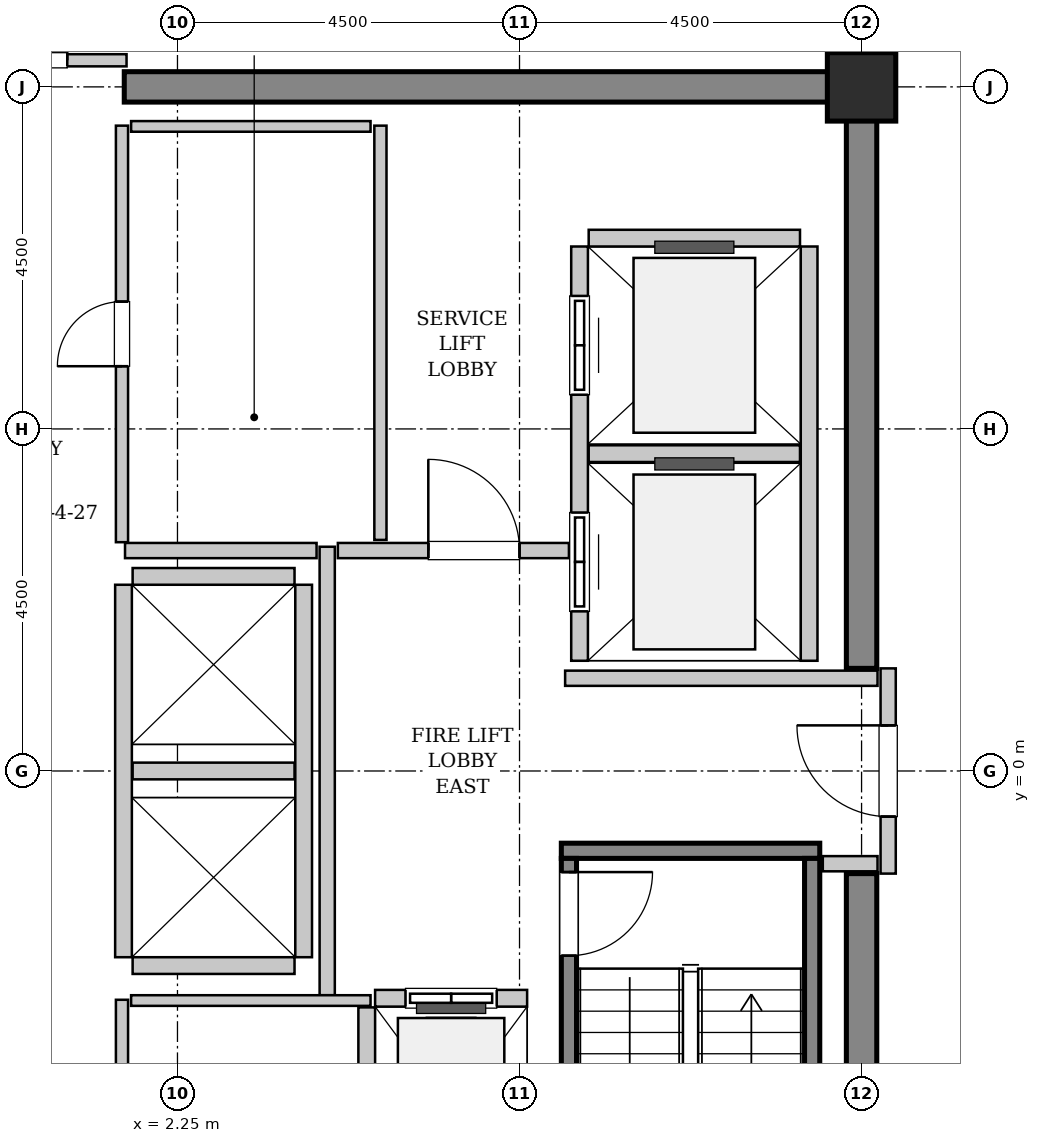
"""IFC4 building model, lengths in metres.
Left out: names, types, materials, properties, quantities, classifications, styles, units other than length and angle.
Written with IfcOpenShell. Run it as: python <this file> out.ifc"""

import sys

from ifc_helpers import new_model, si_unit, direction, frame, frame_2d, origin, origin_2d, place, context, subcontext, project, spatial, rectangle, extrude, source, transform, mapped, element, fill, save


model = new_model("IFC4")
c1 = context("Model", 3, precision=1e-05, world=origin(), true_north=direction((0.0, 1.0)))
c2 = subcontext(c1, "Body", "Model", "MODEL_VIEW")
j1 = project(units=[si_unit("LENGTHUNIT", "METRE"), si_unit("PLANEANGLEUNIT", "RADIAN")], contexts=[c1])
p1 = place(None, origin())
s1 = spatial("IfcSite", under=j1, at=p1, CompositionType="ELEMENT")
p2 = place(p1, origin())
s2 = spatial("IfcBuilding", under=s1, at=p2, CompositionType="ELEMENT")
p3 = place(p2, frame((0.0, 0.0, 326.2)))
s3 = spatial("IfcBuildingStorey", under=s2, at=p3, CompositionType="ELEMENT", Elevation=326.2)
m1 = source(origin(), c2, "Body", "SweptSolid", [
    extrude(rectangle(XDim=9.9, YDim=0.4, at=frame_2d((4.95, 0.0))), origin(), (0.0, 0.0, 1.0), 3.8),
])
p4 = place(p3, frame((1.55, 9.0, 0.0), z_axis=(0.0, 0.0, 1.0), x_axis=(1.0, 0.0, 0.0)))
e1 = element("IfcWall", 1, at=p4, inside=s3, PredefinedType="SHEAR", context=c2, shape_type="MappedRepresentation", body=[
    mapped(m1, transform((0.0, 0.0, 0.0), x_axis=(1.0, 0.0, 0.0), y_axis=(0.0, 1.0, 0.0), z_axis=(0.0, 0.0, 1.0), scale=1.0)),
])
m2 = source(origin(), c2, "Body", "SweptSolid", [
    extrude(rectangle(XDim=7.45, YDim=0.4, at=frame_2d((3.725, 0.0))), origin(), (0.0, 0.0, 1.0), 3.8),
])
for number, where, z_axis, x_axis in (
    (2, (11.25, -8.8, 0.0), (0.0, 0.0, 1.0), (0.0, 1.0, 0.0)),
    (3, (11.25, 1.35, 0.0), (0.0, 0.0, 1.0), (0.0, 1.0, 0.0)),
):
    element("IfcWall", number, at=place(p3, frame(where, z_axis=z_axis, x_axis=x_axis)), inside=s3, PredefinedType="SHEAR", context=c2, shape_type="MappedRepresentation", body=[
        mapped(m2, transform((0.0, 0.0, 0.0), x_axis=(1.0, 0.0, 0.0), y_axis=(0.0, 1.0, 0.0), z_axis=(0.0, 0.0, 1.0), scale=1.0)),
    ])
m3 = source(origin(), c2, "Body", "SweptSolid", [
    extrude(rectangle(XDim=0.9, YDim=0.9, at=origin_2d()), origin(), (0.0, 0.0, 1.0), 3.8),
])
p5 = place(p3, frame((11.25, 9.0, 0.0), z_axis=(0.0, 0.0, 1.0), x_axis=(1.0, 0.0, 0.0)))
e4 = element("IfcColumn", 4, at=p5, inside=s3, PredefinedType="COLUMN", context=c2, shape_type="MappedRepresentation", body=[
    mapped(m3, transform((0.0, 0.0, 0.0), x_axis=(1.0, 0.0, 0.0), y_axis=(0.0, 1.0, 0.0), z_axis=(0.0, 0.0, 1.0), scale=1.0)),
])
m4 = source(origin(), c2, "Body", "SweptSolid", [
    extrude(rectangle(XDim=3.4, YDim=0.2, at=frame_2d((1.7, 0.0))), origin(), (0.0, 0.0, 1.0), 3.8),
])
p6 = place(p3, frame((7.3, -1.05, 0.0), z_axis=(0.0, 0.0, 1.0), x_axis=(1.0, 0.0, 0.0)))
e5 = element("IfcWall", 5, at=p6, inside=s3, PredefinedType="SOLIDWALL", context=c2, shape_type="MappedRepresentation", body=[
    mapped(m4, transform((0.0, 0.0, 0.0), x_axis=(1.0, 0.0, 0.0), y_axis=(0.0, 1.0, 0.0), z_axis=(0.0, 0.0, 1.0), scale=1.0)),
])
m5 = source(origin(), c2, "Body", "SweptSolid", [
    extrude(rectangle(XDim=7.1, YDim=0.2, at=frame_2d((3.55, 0.0))), origin(), (0.0, 0.0, 1.0), 3.8),
])
p7 = place(p3, frame((7.4, -1.15, 0.0), z_axis=(0.0, 0.0, 1.0), x_axis=(0.0, -1.0, 0.0)))
e6 = element("IfcWall", 6, at=p7, inside=s3, PredefinedType="SOLIDWALL", context=c2, shape_type="MappedRepresentation", body=[
    mapped(m5, transform((0.0, 0.0, 0.0), x_axis=(1.0, 0.0, 0.0), y_axis=(0.0, 1.0, 0.0), z_axis=(0.0, 0.0, 1.0), scale=1.0)),
])
p8 = place(p7, frame((0.18, 0.0, 0.0)))
e7 = element("IfcOpeningElement", 7, at=p8, cuts=e6, PredefinedType="OPENING", context=c2, shape_type="SweptSolid", body=[
    extrude(rectangle(XDim=1.1, YDim=2.15, at=frame_2d((0.55, 1.075))), frame((0.0, 0.11, 0.0), z_axis=(0.0, -1.0, 0.0), x_axis=(1.0, 0.0, 0.0)), (0.0, 0.0, 1.0), 0.22),
])
p9 = place(p3, frame((10.6, -1.15, 0.0), z_axis=(0.0, 0.0, 1.0), x_axis=(0.0, -1.0, 0.0)))
e8 = element("IfcWall", 8, at=p9, inside=s3, PredefinedType="SOLIDWALL", context=c2, shape_type="MappedRepresentation", body=[
    mapped(m5, transform((0.0, 0.0, 0.0), x_axis=(1.0, 0.0, 0.0), y_axis=(0.0, 1.0, 0.0), z_axis=(0.0, 0.0, 1.0), scale=1.0)),
])
m6 = source(origin(), c2, "Body", "SweptSolid", [
    extrude(rectangle(XDim=2.0, YDim=0.22, at=frame_2d((1.0, 0.0))), origin(), (0.0, 0.0, 1.0), 3.535),
])
p10 = place(p3, frame((6.85, -2.99, 0.0), z_axis=(0.0, 0.0, 1.0), x_axis=(-1.0, 0.0, 0.0)))
e9 = element("IfcWall", 9, at=p10, inside=s3, PredefinedType="SOLIDWALL", context=c2, shape_type="MappedRepresentation", body=[
    mapped(m6, transform((0.0, 0.0, 0.0), x_axis=(1.0, 0.0, 0.0), y_axis=(0.0, 1.0, 0.0), z_axis=(0.0, 0.0, 1.0), scale=1.0)),
])
p11 = place(p10, frame((0.4, 0.0, 0.0)))
e10 = element("IfcOpeningElement", 10, at=p11, cuts=e9, PredefinedType="OPENING", context=c2, shape_type="SweptSolid", body=[
    extrude(rectangle(XDim=1.2, YDim=2.2, at=frame_2d((0.6, 1.1))), frame((0.0, 0.12, 0.0), z_axis=(0.0, -1.0, 0.0), x_axis=(1.0, 0.0, 0.0)), (0.0, 0.0, 1.0), 0.24),
])
m7 = source(origin(), c2, "Body", "SweptSolid", [
    extrude(rectangle(XDim=2.68, YDim=0.22, at=frame_2d((1.34, 0.0))), origin(), (0.0, 0.0, 1.0), 3.535),
])
p12 = place(p3, frame((4.74, -3.11, 0.0), z_axis=(0.0, 0.0, 1.0), x_axis=(0.0, -1.0, 0.0)))
e11 = element("IfcWall", 11, at=p12, inside=s3, PredefinedType="SOLIDWALL", context=c2, shape_type="MappedRepresentation", body=[
    mapped(m7, transform((0.0, 0.0, 0.0), x_axis=(1.0, 0.0, 0.0), y_axis=(0.0, 1.0, 0.0), z_axis=(0.0, 0.0, 1.0), scale=1.0)),
])
m8 = source(origin(), c2, "Body", "SweptSolid", [
    extrude(rectangle(XDim=5.45, YDim=0.22, at=frame_2d((2.725, 0.0))), origin(), (0.0, 0.0, 1.0), 3.535),
])
p13 = place(p3, frame((7.54, 6.9, 0.0), z_axis=(0.0, 0.0, 1.0), x_axis=(0.0, -1.0, 0.0)))
e12 = element("IfcWall", 12, at=p13, inside=s3, PredefinedType="SOLIDWALL", context=c2, shape_type="MappedRepresentation", body=[
    mapped(m8, transform((0.0, 0.0, 0.0), x_axis=(1.0, 0.0, 0.0), y_axis=(0.0, 1.0, 0.0), z_axis=(0.0, 0.0, 1.0), scale=1.0)),
])
p14 = place(p13, frame((3.5, 0.0, 0.0)))
e13 = element("IfcOpeningElement", 13, at=p14, cuts=e12, PredefinedType="OPENING", context=c2, shape_type="SweptSolid", body=[
    extrude(rectangle(XDim=1.3, YDim=2.3, at=frame_2d((0.65, 1.15))), frame((0.0, 0.12, 0.0), z_axis=(0.0, -1.0, 0.0), x_axis=(1.0, 0.0, 0.0)), (0.0, 0.0, 1.0), 0.24),
])
p15 = place(p13, frame((0.65, 0.0, 0.0)))
e14 = element("IfcOpeningElement", 14, at=p15, cuts=e12, PredefinedType="OPENING", context=c2, shape_type="SweptSolid", body=[
    extrude(rectangle(XDim=1.3, YDim=2.3, at=frame_2d((0.65, 1.15))), frame((0.0, 0.12, 0.0), z_axis=(0.0, -1.0, 0.0), x_axis=(1.0, 0.0, 0.0)), (0.0, 0.0, 1.0), 0.24),
])
p16 = place(p3, frame((10.56, 1.45, 0.0), z_axis=(0.0, 0.0, 1.0), x_axis=(0.0, 1.0, 0.0)))
e15 = element("IfcWall", 15, at=p16, inside=s3, PredefinedType="SOLIDWALL", context=c2, shape_type="MappedRepresentation", body=[
    mapped(m8, transform((0.0, 0.0, 0.0), x_axis=(1.0, 0.0, 0.0), y_axis=(0.0, 1.0, 0.0), z_axis=(0.0, 0.0, 1.0), scale=1.0)),
])
m9 = source(origin(), c2, "Body", "SweptSolid", [
    extrude(rectangle(XDim=2.78, YDim=0.22, at=frame_2d((1.39, 0.0))), origin(), (0.0, 0.0, 1.0), 3.535),
])
for number, where, z_axis, x_axis in (
    (16, (7.66, 4.175, 0.0), (0.0, 0.0, 1.0), (1.0, 0.0, 0.0)),
    (17, (10.44, 7.01, 0.0), (0.0, 0.0, 1.0), (-1.0, 0.0, 0.0)),
):
    element("IfcWall", number, at=place(p3, frame(where, z_axis=z_axis, x_axis=x_axis)), inside=s3, PredefinedType="SOLIDWALL", context=c2, shape_type="MappedRepresentation", body=[
        mapped(m9, transform((0.0, 0.0, 0.0), x_axis=(1.0, 0.0, 0.0), y_axis=(0.0, 1.0, 0.0), z_axis=(0.0, 0.0, 1.0), scale=1.0)),
    ])
m10 = source(origin(), c2, "Body", "SweptSolid", [
    extrude(rectangle(XDim=4.9, YDim=0.22, at=frame_2d((2.45, 0.0))), origin(), (0.0, 0.0, 1.0), 3.535),
])
for number, where, z_axis, x_axis in (
    (18, (1.54, 2.45, 0.0), (0.0, 0.0, 1.0), (0.0, -1.0, 0.0)),
    (19, (3.91, -2.45, 0.0), (0.0, 0.0, 1.0), (0.0, 1.0, 0.0)),
):
    element("IfcWall", number, at=place(p3, frame(where, z_axis=z_axis, x_axis=x_axis)), inside=s3, PredefinedType="SOLIDWALL", context=c2, shape_type="MappedRepresentation", body=[
        mapped(m10, transform((0.0, 0.0, 0.0), x_axis=(1.0, 0.0, 0.0), y_axis=(0.0, 1.0, 0.0), z_axis=(0.0, 0.0, 1.0), scale=1.0)),
    ])
m11 = source(origin(), c2, "Body", "SweptSolid", [
    extrude(rectangle(XDim=2.13, YDim=0.22, at=frame_2d((1.065, 0.0))), origin(), (0.0, 0.0, 1.0), 3.535),
])
for number, where, z_axis, x_axis in (
    (20, (1.66, -2.56, 0.0), (0.0, 0.0, 1.0), (1.0, 0.0, 0.0)),
    (21, (1.66, 0.0, 0.0), (0.0, 0.0, 1.0), (1.0, 0.0, 0.0)),
    (22, (3.79, 2.56, 0.0), (0.0, 0.0, 1.0), (-1.0, 0.0, 0.0)),
):
    element("IfcWall", number, at=place(p3, frame(where, z_axis=z_axis, x_axis=x_axis)), inside=s3, PredefinedType="SOLIDWALL", context=c2, shape_type="MappedRepresentation", body=[
        mapped(m11, transform((0.0, 0.0, 0.0), x_axis=(1.0, 0.0, 0.0), y_axis=(0.0, 1.0, 0.0), z_axis=(0.0, 0.0, 1.0), scale=1.0)),
    ])
m12 = source(origin(), c2, "Body", "SweptSolid", [
    extrude(rectangle(XDim=2.7, YDim=0.2, at=frame_2d((1.35, 0.0))), origin(), (0.0, 0.0, 1.0), 2.625),
])
p17 = place(p3, frame((11.6, -1.35, 0.0), z_axis=(0.0, 0.0, 1.0), x_axis=(0.0, 1.0, 0.0)))
e23 = element("IfcWall", 23, at=p17, inside=s3, PredefinedType="PARTITIONING", context=c2, shape_type="MappedRepresentation", body=[
    mapped(m12, transform((0.0, 0.0, 0.0), x_axis=(1.0, 0.0, 0.0), y_axis=(0.0, 1.0, 0.0), z_axis=(0.0, 0.0, 1.0), scale=1.0)),
])
p18 = place(p17, frame((0.75, 0.0, 0.0)))
e24 = element("IfcOpeningElement", 24, at=p18, cuts=e23, PredefinedType="OPENING", context=c2, shape_type="SweptSolid", body=[
    extrude(rectangle(XDim=1.2, YDim=2.15, at=frame_2d((0.6, 1.075))), frame((0.0, 0.11, 0.0), z_axis=(0.0, -1.0, 0.0), x_axis=(1.0, 0.0, 0.0)), (0.0, 0.0, 1.0), 0.22),
])
m13 = source(origin(), c2, "Body", "SweptSolid", [
    extrude(rectangle(XDim=5.9, YDim=0.2, at=frame_2d((2.95, 0.0))), origin(), (0.0, 0.0, 1.0), 3.535),
])
p19 = place(p3, frame((4.22, -2.95, 0.0), z_axis=(0.0, 0.0, 1.0), x_axis=(0.0, 1.0, 0.0)))
e25 = element("IfcWall", 25, at=p19, inside=s3, PredefinedType="PARTITIONING", context=c2, shape_type="MappedRepresentation", body=[
    mapped(m13, transform((0.0, 0.0, 0.0), x_axis=(1.0, 0.0, 0.0), y_axis=(0.0, 1.0, 0.0), z_axis=(0.0, 0.0, 1.0), scale=1.0)),
])
m14 = source(origin(), c2, "Body", "SweptSolid", [
    extrude(rectangle(XDim=2.52, YDim=0.2, at=frame_2d((1.26, 0.0))), origin(), (0.0, 0.0, 1.0), 3.535),
])
p20 = place(p3, frame((1.56, 2.9, 0.0), z_axis=(0.0, 0.0, 1.0), x_axis=(1.0, 0.0, 0.0)))
e26 = element("IfcWall", 26, at=p20, inside=s3, PredefinedType="PARTITIONING", context=c2, shape_type="MappedRepresentation", body=[
    mapped(m14, transform((0.0, 0.0, 0.0), x_axis=(1.0, 0.0, 0.0), y_axis=(0.0, 1.0, 0.0), z_axis=(0.0, 0.0, 1.0), scale=1.0)),
])
m15 = source(origin(), c2, "Body", "SweptSolid", [
    extrude(rectangle(XDim=3.04, YDim=0.2, at=frame_2d((1.52, 0.0))), origin(), (0.0, 0.0, 1.0), 3.535),
])
p21 = place(p3, frame((4.36, 2.9, 0.0), z_axis=(0.0, 0.0, 1.0), x_axis=(1.0, 0.0, 0.0)))
e27 = element("IfcWall", 27, at=p21, inside=s3, PredefinedType="PARTITIONING", context=c2, shape_type="MappedRepresentation", body=[
    mapped(m15, transform((0.0, 0.0, 0.0), x_axis=(1.0, 0.0, 0.0), y_axis=(0.0, 1.0, 0.0), z_axis=(0.0, 0.0, 1.0), scale=1.0)),
])
p22 = place(p21, frame((1.19, 0.0, 0.0)))
e28 = element("IfcOpeningElement", 28, at=p22, cuts=e27, PredefinedType="OPENING", context=c2, shape_type="SweptSolid", body=[
    extrude(rectangle(XDim=1.2, YDim=2.15, at=frame_2d((0.6, 1.075))), frame((0.0, 0.11, 0.0), z_axis=(0.0, -1.0, 0.0), x_axis=(1.0, 0.0, 0.0)), (0.0, 0.0, 1.0), 0.22),
])
m16 = source(origin(), c2, "Body", "SweptSolid", [
    extrude(rectangle(XDim=4.11, YDim=0.2, at=frame_2d((2.055, 0.0))), origin(), (0.0, 0.0, 1.0), 3.535),
])
p23 = place(p3, frame((7.35, 1.22, 0.0), z_axis=(0.0, 0.0, 1.0), x_axis=(1.0, 0.0, 0.0)))
e29 = element("IfcWall", 29, at=p23, inside=s3, PredefinedType="PARTITIONING", context=c2, shape_type="MappedRepresentation", body=[
    mapped(m16, transform((0.0, 0.0, 0.0), x_axis=(1.0, 0.0, 0.0), y_axis=(0.0, 1.0, 0.0), z_axis=(0.0, 0.0, 1.0), scale=1.0)),
])
m17 = source(origin(), c2, "Body", "SweptSolid", [
    extrude(rectangle(XDim=0.72, YDim=0.2, at=frame_2d((0.36, 0.0))), origin(), (0.0, 0.0, 1.0), 3.535),
])
p24 = place(p3, frame((10.74, -1.22, 0.0), z_axis=(0.0, 0.0, 1.0), x_axis=(1.0, 0.0, 0.0)))
e30 = element("IfcWall", 30, at=p24, inside=s3, PredefinedType="PARTITIONING", context=c2, shape_type="MappedRepresentation", body=[
    mapped(m17, transform((0.0, 0.0, 0.0), x_axis=(1.0, 0.0, 0.0), y_axis=(0.0, 1.0, 0.0), z_axis=(0.0, 0.0, 1.0), scale=1.0)),
])
m18 = source(origin(), c2, "Body", "SweptSolid", [
    extrude(rectangle(XDim=3.16, YDim=0.16, at=frame_2d((1.58, 0.0))), origin(), (0.0, 0.0, 1.0), 2.625),
])
p25 = place(p3, frame((-1.58, 9.35, 0.0), z_axis=(0.0, 0.0, 1.0), x_axis=(1.0, 0.0, 0.0)))
e31 = element("IfcWall", 31, at=p25, inside=s3, PredefinedType="PARTITIONING", context=c2, shape_type="MappedRepresentation", body=[
    mapped(m18, transform((0.0, 0.0, 0.0), x_axis=(1.0, 0.0, 0.0), y_axis=(0.0, 1.0, 0.0), z_axis=(0.0, 0.0, 1.0), scale=1.0)),
])
p26 = place(p25, frame((0.78, 0.0, 0.0)))
e32 = element("IfcOpeningElement", 32, at=p26, cuts=e31, PredefinedType="OPENING", context=c2, shape_type="SweptSolid", body=[
    extrude(rectangle(XDim=1.6, YDim=2.3, at=frame_2d((0.8, 1.15))), frame((0.0, 0.09, 0.0), z_axis=(0.0, -1.0, 0.0), x_axis=(1.0, 0.0, 0.0)), (0.0, 0.0, 1.0), 0.18),
])
m19 = source(origin(), c2, "Body", "SweptSolid", [
    extrude(rectangle(XDim=5.45, YDim=0.16, at=frame_2d((2.725, 0.0))), origin(), (0.0, 0.0, 1.0), 3.535),
])
p27 = place(p3, frame((4.92, 3.04, 0.0), z_axis=(0.0, 0.0, 1.0), x_axis=(0.0, 1.0, 0.0)))
e33 = element("IfcWall", 33, at=p27, inside=s3, PredefinedType="PARTITIONING", context=c2, shape_type="MappedRepresentation", body=[
    mapped(m19, transform((0.0, 0.0, 0.0), x_axis=(1.0, 0.0, 0.0), y_axis=(0.0, 1.0, 0.0), z_axis=(0.0, 0.0, 1.0), scale=1.0)),
])
m20 = source(origin(), c2, "Body", "SweptSolid", [
    extrude(rectangle(XDim=5.48, YDim=0.16, at=frame_2d((2.74, 0.0))), origin(), (0.0, 0.0, 1.0), 3.535),
])
p28 = place(p3, frame((1.52, 3.01, 0.0), z_axis=(0.0, 0.0, 1.0), x_axis=(0.0, 1.0, 0.0)))
e34 = element("IfcWall", 34, at=p28, inside=s3, PredefinedType="PARTITIONING", context=c2, shape_type="MappedRepresentation", body=[
    mapped(m20, transform((0.0, 0.0, 0.0), x_axis=(1.0, 0.0, 0.0), y_axis=(0.0, 1.0, 0.0), z_axis=(0.0, 0.0, 1.0), scale=1.0)),
])
p29 = place(p28, frame((2.315, 0.0, 0.0)))
e35 = element("IfcOpeningElement", 35, at=p29, cuts=e34, PredefinedType="OPENING", context=c2, shape_type="SweptSolid", body=[
    extrude(rectangle(XDim=0.85, YDim=2.1, at=frame_2d((0.425, 1.05))), frame((0.0, 0.09, 0.0), z_axis=(0.0, -1.0, 0.0), x_axis=(1.0, 0.0, 0.0)), (0.0, 0.0, 1.0), 0.18),
])
m21 = source(origin(), c2, "Body", "SweptSolid", [
    extrude(rectangle(XDim=3.15, YDim=0.14, at=frame_2d((1.575, 0.0))), origin(), (0.0, 0.0, 1.0), 3.535),
])
p30 = place(p3, frame((1.64, 8.48, 0.0), z_axis=(0.0, 0.0, 1.0), x_axis=(1.0, 0.0, 0.0)))
e36 = element("IfcWall", 36, at=p30, inside=s3, PredefinedType="PARTITIONING", context=c2, shape_type="MappedRepresentation", body=[
    mapped(m21, transform((0.0, 0.0, 0.0), x_axis=(1.0, 0.0, 0.0), y_axis=(0.0, 1.0, 0.0), z_axis=(0.0, 0.0, 1.0), scale=1.0)),
])
p31 = place(p3, frame((1.52, -8.49, 0.0), z_axis=(0.0, 0.0, 1.0), x_axis=(0.0, 1.0, 0.0)))
e37 = element("IfcWall", 37, at=p31, inside=s3, PredefinedType="PARTITIONING", context=c2, shape_type="MappedRepresentation", body=[
    mapped(m20, transform((0.0, 0.0, 0.0), x_axis=(1.0, 0.0, 0.0), y_axis=(0.0, 1.0, 0.0), z_axis=(0.0, 0.0, 1.0), scale=1.0)),
])
p32 = place(p31, frame((2.315, 0.0, 0.0)))
e38 = element("IfcOpeningElement", 38, at=p32, cuts=e37, PredefinedType="OPENING", context=c2, shape_type="SweptSolid", body=[
    extrude(rectangle(XDim=0.85, YDim=2.1, at=frame_2d((0.425, 1.05))), frame((0.0, 0.09, 0.0), z_axis=(0.0, -1.0, 0.0), x_axis=(1.0, 0.0, 0.0)), (0.0, 0.0, 1.0), 0.18),
])
p33 = place(p3, frame((1.64, -3.02, 0.0), z_axis=(0.0, 0.0, 1.0), x_axis=(1.0, 0.0, 0.0)))
e39 = element("IfcWall", 39, at=p33, inside=s3, PredefinedType="PARTITIONING", context=c2, shape_type="MappedRepresentation", body=[
    mapped(m21, transform((0.0, 0.0, 0.0), x_axis=(1.0, 0.0, 0.0), y_axis=(0.0, 1.0, 0.0), z_axis=(0.0, 0.0, 1.0), scale=1.0)),
])
m22 = source(origin(), c2, "Body", "SweptSolid", [
    extrude(rectangle(XDim=1.1, YDim=2.15, at=frame_2d((0.55, 1.075))), frame((0.0, 0.025, 0.0), z_axis=(0.0, -1.0, 0.0), x_axis=(1.0, 0.0, 0.0)), (0.0, 0.0, 1.0), 0.05),
])
p34 = place(p8, origin())
e40 = element("IfcDoor", 40, at=p34, inside=s3, OperationType="SINGLE_SWING_LEFT", PredefinedType="DOOR", context=c2, shape_type="MappedRepresentation", body=[
    mapped(m22, transform((0.0, 0.0, 0.0), x_axis=(1.0, 0.0, 0.0), y_axis=(0.0, 1.0, 0.0), z_axis=(0.0, 0.0, 1.0), scale=1.0)),
])
fill(e7, e40)
m23 = source(origin(), c2, "Body", "SweptSolid", [
    extrude(rectangle(XDim=1.2, YDim=2.2, at=frame_2d((0.6, 1.1))), frame((0.0, 0.025, 0.0), z_axis=(0.0, -1.0, 0.0), x_axis=(1.0, 0.0, 0.0)), (0.0, 0.0, 1.0), 0.05),
])
p35 = place(p11, origin())
e41 = element("IfcDoor", 41, at=p35, inside=s3, OperationType="SLIDING_TO_LEFT", PredefinedType="DOOR", context=c2, shape_type="MappedRepresentation", body=[
    mapped(m23, transform((0.0, 0.0, 0.0), x_axis=(1.0, 0.0, 0.0), y_axis=(0.0, 1.0, 0.0), z_axis=(0.0, 0.0, 1.0), scale=1.0)),
])
fill(e10, e41)
m24 = source(origin(), c2, "Body", "SweptSolid", [
    extrude(rectangle(XDim=1.3, YDim=2.3, at=frame_2d((0.65, 1.15))), frame((0.0, 0.025, 0.0), z_axis=(0.0, -1.0, 0.0), x_axis=(1.0, 0.0, 0.0)), (0.0, 0.0, 1.0), 0.05),
])
p36 = place(p14, origin())
e42 = element("IfcDoor", 42, at=p36, inside=s3, OperationType="SLIDING_TO_RIGHT", PredefinedType="DOOR", context=c2, shape_type="MappedRepresentation", body=[
    mapped(m24, transform((0.0, 0.0, 0.0), x_axis=(1.0, 0.0, 0.0), y_axis=(0.0, 1.0, 0.0), z_axis=(0.0, 0.0, 1.0), scale=1.0)),
])
fill(e13, e42)
p37 = place(p15, origin())
e43 = element("IfcDoor", 43, at=p37, inside=s3, OperationType="SLIDING_TO_RIGHT", PredefinedType="DOOR", context=c2, shape_type="MappedRepresentation", body=[
    mapped(m24, transform((0.0, 0.0, 0.0), x_axis=(1.0, 0.0, 0.0), y_axis=(0.0, 1.0, 0.0), z_axis=(0.0, 0.0, 1.0), scale=1.0)),
])
fill(e14, e43)
m25 = source(origin(), c2, "Body", "SweptSolid", [
    extrude(rectangle(XDim=1.2, YDim=2.15, at=frame_2d((0.6, 1.075))), frame((0.0, 0.025, 0.0), z_axis=(0.0, -1.0, 0.0), x_axis=(1.0, 0.0, 0.0)), (0.0, 0.0, 1.0), 0.05),
])
p38 = place(p18, origin())
e44 = element("IfcDoor", 44, at=p38, inside=s3, OperationType="SINGLE_SWING_RIGHT", PredefinedType="DOOR", context=c2, shape_type="MappedRepresentation", body=[
    mapped(m25, transform((0.0, 0.0, 0.0), x_axis=(1.0, 0.0, 0.0), y_axis=(0.0, 1.0, 0.0), z_axis=(0.0, 0.0, 1.0), scale=1.0)),
])
fill(e24, e44)
p39 = place(p22, origin())
e45 = element("IfcDoor", 45, at=p39, inside=s3, OperationType="SINGLE_SWING_LEFT", PredefinedType="DOOR", context=c2, shape_type="MappedRepresentation", body=[
    mapped(m25, transform((0.0, 0.0, 0.0), x_axis=(1.0, 0.0, 0.0), y_axis=(0.0, 1.0, 0.0), z_axis=(0.0, 0.0, 1.0), scale=1.0)),
])
fill(e28, e45)
m26 = source(origin(), c2, "Body", "SweptSolid", [
    extrude(rectangle(XDim=1.6, YDim=2.3, at=frame_2d((0.8, 1.15))), frame((0.0, 0.025, 0.0), z_axis=(0.0, -1.0, 0.0), x_axis=(1.0, 0.0, 0.0)), (0.0, 0.0, 1.0), 0.05),
])
p40 = place(p26, origin())
e46 = element("IfcDoor", 46, at=p40, inside=s3, OperationType="DOUBLE_DOOR_SINGLE_SWING", PredefinedType="DOOR", context=c2, shape_type="MappedRepresentation", body=[
    mapped(m26, transform((0.0, 0.0, 0.0), x_axis=(1.0, 0.0, 0.0), y_axis=(0.0, 1.0, 0.0), z_axis=(0.0, 0.0, 1.0), scale=1.0)),
])
fill(e32, e46)
m27 = source(origin(), c2, "Body", "SweptSolid", [
    extrude(rectangle(XDim=0.85, YDim=2.1, at=frame_2d((0.425, 1.05))), frame((0.0, 0.025, 0.0), z_axis=(0.0, -1.0, 0.0), x_axis=(1.0, 0.0, 0.0)), (0.0, 0.0, 1.0), 0.05),
])
p41 = place(p29, origin())
e47 = element("IfcDoor", 47, at=p41, inside=s3, OperationType="SINGLE_SWING_LEFT", PredefinedType="DOOR", context=c2, shape_type="MappedRepresentation", body=[
    mapped(m27, transform((0.0, 0.0, 0.0), x_axis=(1.0, 0.0, 0.0), y_axis=(0.0, 1.0, 0.0), z_axis=(0.0, 0.0, 1.0), scale=1.0)),
])
fill(e35, e47)
save(model, sys.argv[1])
